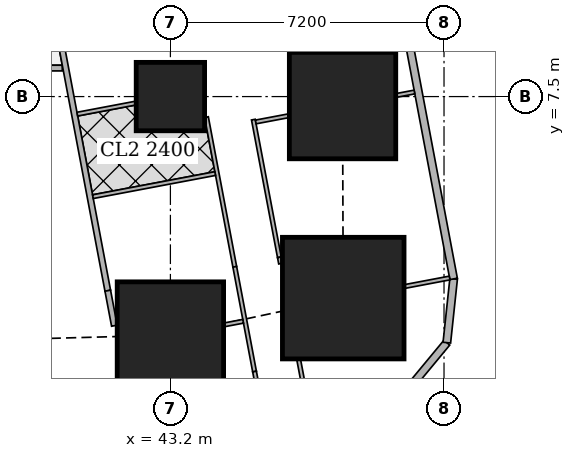
"""IFC4 building model, lengths in metres.
Left out: names, types, materials, properties, quantities, classifications, styles, units other than length and angle.
Written with IfcOpenShell. Run it as: python <this file> out.ifc"""

import sys

from ifc_helpers import new_model, si_unit, direction, frame, frame_2d, origin, origin_2d, place, context, subcontext, project, spatial, rectangle, extrude, element, fill, save


model = new_model("IFC4")
c1 = context("Model", 3, precision=1e-05, world=origin(), true_north=direction((0.0, 1.0)))
c2 = subcontext(c1, "Body", "Model", "MODEL_VIEW")
j1 = project(units=[si_unit("LENGTHUNIT", "METRE"), si_unit("PLANEANGLEUNIT", "RADIAN")], contexts=[c1])
p1 = place(None, origin())
s1 = spatial("IfcSite", under=j1, at=p1, CompositionType="ELEMENT")
p2 = place(p1, origin())
s2 = spatial("IfcBuilding", under=s1, at=p2, CompositionType="ELEMENT")
p3 = place(p2, frame((0.0, 0.0, 31.25)))
s3 = spatial("IfcBuildingStorey", under=s2, at=p3, CompositionType="ELEMENT", Elevation=31.25)
p4 = place(p3, frame((43.2, 1.225, 0.0), z_axis=(0.0, 0.0, 1.0), x_axis=(1.0, 0.0, 0.0)))
e1 = element("IfcColumn", 1, at=p4, inside=s3, PredefinedType="COLUMN", context=c2, shape_type="SweptSolid", body=[
    extrude(rectangle(XDim=2.8, YDim=2.8, at=origin_2d()), origin(), (0.0, 0.0, 1.0), 3.75),
])
p5 = place(p3, frame((47.748, 2.197, 0.0), z_axis=(0.0, 0.0, 1.0), x_axis=(1.0, 0.0, 0.0)))
e2 = element("IfcColumn", 2, at=p5, inside=s3, PredefinedType="COLUMN", context=c2, shape_type="SweptSolid", body=[
    extrude(rectangle(XDim=3.2, YDim=3.2, at=origin_2d()), origin(), (0.0, 0.0, 1.0), 3.75),
])
p6 = place(p3, frame((43.2, 7.5, 0.0), z_axis=(0.0, 0.0, 1.0), x_axis=(1.0, 0.0, 0.0)))
e3 = element("IfcColumn", 3, at=p6, inside=s3, PredefinedType="COLUMN", context=c2, shape_type="SweptSolid", body=[
    extrude(rectangle(XDim=1.8, YDim=1.8, at=origin_2d()), origin(), (0.0, 0.0, 1.0), 3.75),
])
p7 = place(p3, frame((47.73, 7.263, 0.0), z_axis=(0.0, 0.0, 1.0), x_axis=(1.0, 0.0, 0.0)))
e4 = element("IfcColumn", 4, at=p7, inside=s3, PredefinedType="COLUMN", context=c2, shape_type="SweptSolid", body=[
    extrude(rectangle(XDim=2.8, YDim=2.8, at=origin_2d()), origin(), (0.0, 0.0, 1.0), 3.75),
])
p8 = place(p3, frame((49.407, -0.263, 0.0), z_axis=(0.0, 0.0, 1.0), x_axis=(0.638042593423, 0.770001070764, 0.0)))
e5 = element("IfcWall", 5, at=p8, inside=s3, PredefinedType="SOLIDWALL", context=c2, shape_type="SweptSolid", body=[
    extrude(rectangle(XDim=1.673, YDim=0.2, at=frame_2d((0.836, 0.0))), origin(), (0.0, 0.0, 1.0), 3.5),
])
p9 = place(p3, frame((50.474, 1.025, 0.0), z_axis=(0.0, 0.0, 1.0), x_axis=(0.106047815515, 0.994361031429, 0.0)))
e6 = element("IfcWall", 6, at=p9, inside=s3, PredefinedType="SOLIDWALL", context=c2, shape_type="SweptSolid", body=[
    extrude(rectangle(XDim=1.688, YDim=0.2, at=frame_2d((0.844, 0.0))), origin(), (0.0, 0.0, 1.0), 3.5),
])
p10 = place(p3, frame((50.653, 2.703, 0.0), z_axis=(0.0, 0.0, 1.0), x_axis=(-0.185612026696, 0.982623109613, 0.0)))
e7 = element("IfcWall", 7, at=p10, inside=s3, PredefinedType="SOLIDWALL", context=c2, shape_type="SweptSolid", body=[
    extrude(rectangle(XDim=41.393, YDim=0.2, at=frame_2d((20.697, 0.0))), origin(), (0.0, 0.0, 1.0), 3.5),
])
p11 = place(p10, frame((1.633, 0.0, 0.9)))
e8 = element("IfcOpeningElement", 8, at=p11, cuts=e7, PredefinedType="OPENING", context=c2, shape_type="SweptSolid", body=[
    extrude(rectangle(XDim=1.8, YDim=1.5, at=frame_2d((0.9, 0.75))), frame((0.0, 0.11, 0.0), z_axis=(0.0, -1.0, 0.0), x_axis=(1.0, 0.0, 0.0)), (0.0, 0.0, 1.0), 0.22),
])
p12 = place(p10, frame((6.032, 0.0, 0.9)))
e9 = element("IfcOpeningElement", 9, at=p12, cuts=e7, PredefinedType="OPENING", context=c2, shape_type="SweptSolid", body=[
    extrude(rectangle(XDim=1.8, YDim=1.5, at=frame_2d((0.9, 0.75))), frame((0.0, 0.11, 0.0), z_axis=(0.0, -1.0, 0.0), x_axis=(1.0, 0.0, 0.0)), (0.0, 0.0, 1.0), 0.22),
])
p13 = place(p10, frame((9.848, 0.0, 0.9)))
e10 = element("IfcOpeningElement", 10, at=p13, cuts=e7, PredefinedType="OPENING", context=c2, shape_type="SweptSolid", body=[
    extrude(rectangle(XDim=1.8, YDim=1.5, at=frame_2d((0.9, 0.75))), frame((0.0, 0.11, 0.0), z_axis=(0.0, -1.0, 0.0), x_axis=(1.0, 0.0, 0.0)), (0.0, 0.0, 1.0), 0.22),
])
p14 = place(p10, frame((17.481, 0.0, 0.9)))
e11 = element("IfcOpeningElement", 11, at=p14, cuts=e7, PredefinedType="OPENING", context=c2, shape_type="SweptSolid", body=[
    extrude(rectangle(XDim=1.8, YDim=1.5, at=frame_2d((0.9, 0.75))), frame((0.0, 0.11, 0.0), z_axis=(0.0, -1.0, 0.0), x_axis=(1.0, 0.0, 0.0)), (0.0, 0.0, 1.0), 0.22),
])
p15 = place(p10, frame((21.297, 0.0, 0.9)))
e12 = element("IfcOpeningElement", 12, at=p15, cuts=e7, PredefinedType="OPENING", context=c2, shape_type="SweptSolid", body=[
    extrude(rectangle(XDim=1.8, YDim=1.5, at=frame_2d((0.9, 0.75))), frame((0.0, 0.11, 0.0), z_axis=(0.0, -1.0, 0.0), x_axis=(1.0, 0.0, 0.0)), (0.0, 0.0, 1.0), 0.22),
])
p16 = place(p10, frame((25.113, 0.0, 0.9)))
e13 = element("IfcOpeningElement", 13, at=p16, cuts=e7, PredefinedType="OPENING", context=c2, shape_type="SweptSolid", body=[
    extrude(rectangle(XDim=1.8, YDim=1.5, at=frame_2d((0.9, 0.75))), frame((0.0, 0.11, 0.0), z_axis=(0.0, -1.0, 0.0), x_axis=(1.0, 0.0, 0.0)), (0.0, 0.0, 1.0), 0.22),
])
p17 = place(p10, frame((28.93, 0.0, 0.9)))
e14 = element("IfcOpeningElement", 14, at=p17, cuts=e7, PredefinedType="OPENING", context=c2, shape_type="SweptSolid", body=[
    extrude(rectangle(XDim=1.8, YDim=1.5, at=frame_2d((0.9, 0.75))), frame((0.0, 0.11, 0.0), z_axis=(0.0, -1.0, 0.0), x_axis=(1.0, 0.0, 0.0)), (0.0, 0.0, 1.0), 0.22),
])
p18 = place(p10, frame((32.746, 0.0, 0.9)))
e15 = element("IfcOpeningElement", 15, at=p18, cuts=e7, PredefinedType="OPENING", context=c2, shape_type="SweptSolid", body=[
    extrude(rectangle(XDim=1.8, YDim=1.5, at=frame_2d((0.9, 0.75))), frame((0.0, 0.11, 0.0), z_axis=(0.0, -1.0, 0.0), x_axis=(1.0, 0.0, 0.0)), (0.0, 0.0, 1.0), 0.22),
])
p19 = place(p10, frame((36.481, 0.0, 0.9)))
e16 = element("IfcOpeningElement", 16, at=p19, cuts=e7, PredefinedType="OPENING", context=c2, shape_type="SweptSolid", body=[
    extrude(rectangle(XDim=1.8, YDim=1.5, at=frame_2d((0.9, 0.75))), frame((0.0, 0.11, 0.0), z_axis=(0.0, -1.0, 0.0), x_axis=(1.0, 0.0, 0.0)), (0.0, 0.0, 1.0), 0.22),
])
p20 = place(p3, frame((40.355, 8.25, 0.0), z_axis=(0.0, 0.0, 1.0), x_axis=(-1.0, 0.0, 0.0)))
e17 = element("IfcWall", 17, at=p20, inside=s3, PredefinedType="SOLIDWALL", context=c2, shape_type="SweptSolid", body=[
    extrude(rectangle(XDim=3.454, YDim=0.15, at=frame_2d((1.727, 0.0))), origin(), (0.0, 0.0, 1.0), 3.5),
])
p21 = place(p20, frame((0.15, 0.0, 0.0)))
e18 = element("IfcOpeningElement", 18, at=p21, cuts=e17, PredefinedType="OPENING", context=c2, shape_type="SweptSolid", body=[
    extrude(rectangle(XDim=1.0, YDim=2.1, at=frame_2d((0.5, 1.05))), frame((0.0, 0.085, 0.0), z_axis=(0.0, -1.0, 0.0), x_axis=(1.0, 0.0, 0.0)), (0.0, 0.0, 1.0), 0.17),
])
p22 = place(p3, frame((35.094, 36.585, 0.0), z_axis=(0.0, 0.0, 1.0), x_axis=(0.185588860311, -0.982627485331, 0.0)))
e19 = element("IfcWall", 19, at=p22, inside=s3, PredefinedType="SOLIDWALL", context=c2, shape_type="SweptSolid", body=[
    extrude(rectangle(XDim=34.797, YDim=0.15, at=frame_2d((17.399, 0.0))), origin(), (0.0, 0.0, 1.0), 2.5),
])
p23 = place(p22, frame((6.012, 0.0, 0.0)))
e20 = element("IfcOpeningElement", 20, at=p23, cuts=e19, PredefinedType="OPENING", context=c2, shape_type="SweptSolid", body=[
    extrude(rectangle(XDim=1.0, YDim=2.1, at=frame_2d((0.5, 1.05))), frame((0.0, 0.085, 0.0), z_axis=(0.0, -1.0, 0.0), x_axis=(1.0, 0.0, 0.0)), (0.0, 0.0, 1.0), 0.17),
])
p24 = place(p22, frame((9.828, 0.0, 0.0)))
e21 = element("IfcOpeningElement", 21, at=p24, cuts=e19, PredefinedType="OPENING", context=c2, shape_type="SweptSolid", body=[
    extrude(rectangle(XDim=1.0, YDim=2.1, at=frame_2d((0.5, 1.05))), frame((0.0, 0.085, 0.0), z_axis=(0.0, -1.0, 0.0), x_axis=(1.0, 0.0, 0.0)), (0.0, 0.0, 1.0), 0.17),
])
p25 = place(p22, frame((25.9, 0.0, 0.0)))
e22 = element("IfcOpeningElement", 22, at=p25, cuts=e19, PredefinedType="OPENING", context=c2, shape_type="SweptSolid", body=[
    extrude(rectangle(XDim=1.0, YDim=2.1, at=frame_2d((0.5, 1.05))), frame((0.0, 0.085, 0.0), z_axis=(0.0, -1.0, 0.0), x_axis=(1.0, 0.0, 0.0)), (0.0, 0.0, 1.0), 0.17),
])
p26 = place(p3, frame((41.552, 2.392, 0.0), z_axis=(0.0, 0.0, 1.0), x_axis=(0.185687800081, -0.982608793417, 0.0)))
e23 = element("IfcWall", 23, at=p26, inside=s3, PredefinedType="SOLIDWALL", context=c2, shape_type="SweptSolid", body=[
    extrude(rectangle(XDim=0.938, YDim=0.15, at=frame_2d((0.469, 0.0))), origin(), (0.0, 0.0, 1.0), 2.05),
])
p27 = place(p3, frame((45.383, 6.894, 0.0), z_axis=(0.0, 0.0, 1.0), x_axis=(0.185791461635, -0.982589198385, 0.0)))
e24 = element("IfcWall", 24, at=p27, inside=s3, PredefinedType="PARTITIONING", context=c2, shape_type="SweptSolid", body=[
    extrude(rectangle(XDim=3.687, YDim=0.1, at=frame_2d((1.844, 0.0))), origin(), (0.0, 0.0, 1.0), 3.5),
])
p28 = place(p27, frame((1.3, 0.0, 0.0)))
e25 = element("IfcOpeningElement", 25, at=p28, cuts=e24, PredefinedType="OPENING", context=c2, shape_type="SweptSolid", body=[
    extrude(rectangle(XDim=0.9, YDim=2.1, at=frame_2d((0.45, 1.05))), frame((0.0, 0.06, 0.0), z_axis=(0.0, -1.0, 0.0), x_axis=(1.0, 0.0, 0.0)), (0.0, 0.0, 1.0), 0.12),
])
p29 = place(p3, frame((46.068, 3.271, 0.0), z_axis=(0.0, 0.0, 1.0), x_axis=(0.183590240121, -0.98300286049, 0.0)))
e26 = element("IfcWall", 26, at=p29, inside=s3, PredefinedType="PARTITIONING", context=c2, shape_type="SweptSolid", body=[
    extrude(rectangle(XDim=0.169, YDim=0.1, at=frame_2d((0.084, 0.0))), origin(), (0.0, 0.0, 1.0), 2.05),
])
p30 = place(p3, frame((46.574, 0.587, 0.0), z_axis=(0.0, 0.0, 1.0), x_axis=(0.185997942803, -0.98255013372, 0.0)))
e27 = element("IfcWall", 27, at=p30, inside=s3, PredefinedType="PARTITIONING", context=c2, shape_type="SweptSolid", body=[
    extrude(rectangle(XDim=1.259, YDim=0.1, at=frame_2d((0.629, 0.0))), origin(), (0.0, 0.0, 1.0), 2.05),
])
p31 = place(p3, frame((44.149, 6.96, 0.0), z_axis=(0.0, 0.0, 1.0), x_axis=(0.185824941804, -0.982582867245, 0.0)))
e28 = element("IfcWall", 28, at=p31, inside=s3, PredefinedType="PARTITIONING", context=c2, shape_type="SweptSolid", body=[
    extrude(rectangle(XDim=4.01, YDim=0.1, at=frame_2d((2.005, 0.0))), origin(), (0.0, 0.0, 1.0), 3.5),
])
p32 = place(p31, frame((0.35, 0.0, 0.0)))
e29 = element("IfcOpeningElement", 29, at=p32, cuts=e28, PredefinedType="OPENING", context=c2, shape_type="SweptSolid", body=[
    extrude(rectangle(XDim=0.9, YDim=2.1, at=frame_2d((0.45, 1.05))), frame((0.0, 0.06, 0.0), z_axis=(0.0, -1.0, 0.0), x_axis=(1.0, 0.0, 0.0)), (0.0, 0.0, 1.0), 0.12),
])
p33 = place(p31, frame((1.856, 0.0, 0.0)))
e30 = element("IfcOpeningElement", 30, at=p33, cuts=e28, PredefinedType="OPENING", context=c2, shape_type="SweptSolid", body=[
    extrude(rectangle(XDim=0.9, YDim=2.1, at=frame_2d((0.45, 1.05))), frame((0.0, 0.06, 0.0), z_axis=(0.0, -1.0, 0.0), x_axis=(1.0, 0.0, 0.0)), (0.0, 0.0, 1.0), 0.12),
])
p34 = place(p3, frame((44.894, 3.02, 0.0), z_axis=(0.0, 0.0, 1.0), x_axis=(0.185471317237, -0.982649678412, 0.0)))
e31 = element("IfcWall", 31, at=p34, inside=s3, PredefinedType="PARTITIONING", context=c2, shape_type="SweptSolid", body=[
    extrude(rectangle(XDim=2.804, YDim=0.1, at=frame_2d((1.402, 0.0))), origin(), (0.0, 0.0, 1.0), 2.05),
])
p35 = place(p3, frame((45.414, 0.265, 0.0), z_axis=(0.0, 0.0, 1.0), x_axis=(0.185665855771, -0.982612940074, 0.0)))
e32 = element("IfcWall", 32, at=p35, inside=s3, PredefinedType="PARTITIONING", context=c2, shape_type="SweptSolid", body=[
    extrude(rectangle(XDim=0.931, YDim=0.1, at=frame_2d((0.465, 0.0))), origin(), (0.0, 0.0, 1.0), 3.5),
])
p36 = place(p3, frame((49.622, 7.62, 0.0), z_axis=(0.0, 0.0, 1.0), x_axis=(-0.982629142467, -0.185580086147, 0.0)))
e33 = element("IfcWall", 33, at=p36, inside=s3, PredefinedType="PARTITIONING", context=c2, shape_type="SweptSolid", body=[
    extrude(rectangle(XDim=0.491, YDim=0.1, at=frame_2d((0.245, 0.0))), origin(), (0.0, 0.0, 1.0), 3.5),
])
p37 = place(p3, frame((46.32, 6.997, 0.0), z_axis=(0.0, 0.0, 1.0), x_axis=(-0.982635224332, -0.185547880349, 0.0)))
e34 = element("IfcWall", 34, at=p37, inside=s3, PredefinedType="PARTITIONING", context=c2, shape_type="SweptSolid", body=[
    extrude(rectangle(XDim=0.889, YDim=0.1, at=frame_2d((0.445, 0.0))), origin(), (0.0, 0.0, 1.0), 3.5),
])
p38 = place(p3, frame((50.547, 2.726, 0.0), z_axis=(0.0, 0.0, 1.0), x_axis=(-0.982553313503, -0.185981144539, 0.0)))
e35 = element("IfcWall", 35, at=p38, inside=s3, PredefinedType="PARTITIONING", context=c2, shape_type="SweptSolid", body=[
    extrude(rectangle(XDim=1.21, YDim=0.1, at=frame_2d((0.605, 0.0))), origin(), (0.0, 0.0, 1.0), 3.5),
])
p39 = place(p3, frame((42.29, 7.329, 0.0), z_axis=(0.0, 0.0, 1.0), x_axis=(-0.98258870752, -0.18579405764, 0.0)))
e36 = element("IfcWall", 36, at=p39, inside=s3, PredefinedType="PARTITIONING", context=c2, shape_type="SweptSolid", body=[
    extrude(rectangle(XDim=1.566, YDim=0.1, at=frame_2d((0.783, 0.0))), origin(), (0.0, 0.0, 1.0), 3.5),
])
p40 = place(p3, frame((45.114, 1.587, 0.0), z_axis=(0.0, 0.0, 1.0), x_axis=(-0.982699277433, -0.185208342501, 0.0)))
e37 = element("IfcWall", 37, at=p40, inside=s3, PredefinedType="PARTITIONING", context=c2, shape_type="SweptSolid", body=[
    extrude(rectangle(XDim=0.513, YDim=0.1, at=frame_2d((0.256, 0.0))), origin(), (0.0, 0.0, 1.0), 2.05),
])
p41 = place(p3, frame((44.379, 5.474, 0.0), z_axis=(0.0, 0.0, 1.0), x_axis=(-0.982607026909, -0.185697147715, 0.0)))
e38 = element("IfcWall", 38, at=p41, inside=s3, PredefinedType="PARTITIONING", context=c2, shape_type="SweptSolid", body=[
    extrude(rectangle(XDim=3.275, YDim=0.1, at=frame_2d((1.637, 0.0))), origin(), (0.0, 0.0, 1.0), 3.5),
])
p42 = place(p11, origin())
e39 = element("IfcWindow", 39, at=p42, inside=s3, PartitioningType="SINGLE_PANEL", PredefinedType="WINDOW", context=c2, shape_type="SweptSolid", body=[
    extrude(rectangle(XDim=1.8, YDim=1.5, at=frame_2d((0.9, 0.75))), frame((0.0, 0.03, 0.0), z_axis=(0.0, -1.0, 0.0), x_axis=(1.0, 0.0, 0.0)), (0.0, 0.0, 1.0), 0.06),
])
fill(e8, e39)
p43 = place(p12, origin())
e40 = element("IfcWindow", 40, at=p43, inside=s3, PartitioningType="SINGLE_PANEL", PredefinedType="WINDOW", context=c2, shape_type="SweptSolid", body=[
    extrude(rectangle(XDim=1.8, YDim=1.5, at=frame_2d((0.9, 0.75))), frame((0.0, 0.03, 0.0), z_axis=(0.0, -1.0, 0.0), x_axis=(1.0, 0.0, 0.0)), (0.0, 0.0, 1.0), 0.06),
])
fill(e9, e40)
p44 = place(p21, origin())
e41 = element("IfcDoor", 41, at=p44, inside=s3, OperationType="SINGLE_SWING_LEFT", PredefinedType="DOOR", context=c2, shape_type="SweptSolid", body=[
    extrude(rectangle(XDim=1.0, YDim=2.1, at=frame_2d((0.5, 1.05))), frame((0.0, 0.025, 0.0), z_axis=(0.0, -1.0, 0.0), x_axis=(1.0, 0.0, 0.0)), (0.0, 0.0, 1.0), 0.05),
])
fill(e18, e41)
p45 = place(p28, origin())
e42 = element("IfcDoor", 42, at=p45, inside=s3, OperationType="SINGLE_SWING_LEFT", PredefinedType="DOOR", context=c2, shape_type="SweptSolid", body=[
    extrude(rectangle(XDim=0.9, YDim=2.1, at=frame_2d((0.45, 1.05))), frame((0.0, 0.025, 0.0), z_axis=(0.0, -1.0, 0.0), x_axis=(1.0, 0.0, 0.0)), (0.0, 0.0, 1.0), 0.05),
])
fill(e25, e42)
p46 = place(p32, origin())
e43 = element("IfcDoor", 43, at=p46, inside=s3, OperationType="SINGLE_SWING_RIGHT", PredefinedType="DOOR", context=c2, shape_type="SweptSolid", body=[
    extrude(rectangle(XDim=0.9, YDim=2.1, at=frame_2d((0.45, 1.05))), frame((0.0, 0.025, 0.0), z_axis=(0.0, -1.0, 0.0), x_axis=(1.0, 0.0, 0.0)), (0.0, 0.0, 1.0), 0.05),
])
fill(e29, e43)
p47 = place(p33, origin())
e44 = element("IfcDoor", 44, at=p47, inside=s3, OperationType="SINGLE_SWING_RIGHT", PredefinedType="DOOR", context=c2, shape_type="SweptSolid", body=[
    extrude(rectangle(XDim=0.9, YDim=2.1, at=frame_2d((0.45, 1.05))), frame((0.0, 0.025, 0.0), z_axis=(0.0, -1.0, 0.0), x_axis=(1.0, 0.0, 0.0)), (0.0, 0.0, 1.0), 0.05),
])
fill(e30, e44)
save(model, sys.argv[1])
